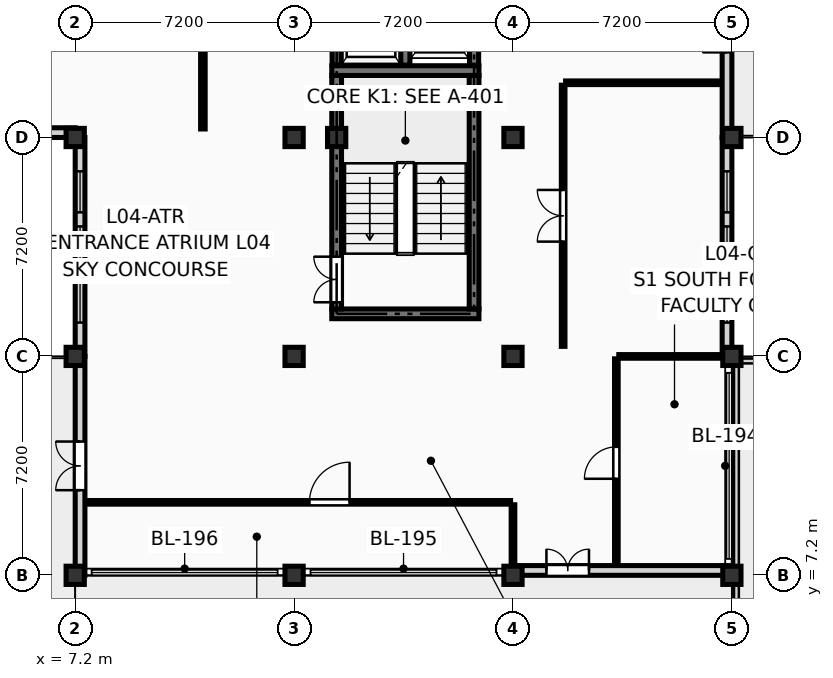
"""IFC4 building model, lengths in metres.
Left out: names, types, materials, properties, quantities, classifications, styles, units other than length and angle.
Written with IfcOpenShell. Run it as: python <this file> out.ifc"""

import sys

from ifc_helpers import new_model, si_unit, direction, frame, frame_2d, origin, origin_2d, place, context, subcontext, project, spatial, rectangle, extrude, element, fill, save


model = new_model("IFC4")
c1 = context("Model", 3, precision=1e-05, world=origin(), true_north=direction((0.0, 1.0)))
c2 = subcontext(c1, "Body", "Model", "MODEL_VIEW")
j1 = project(units=[si_unit("LENGTHUNIT", "METRE"), si_unit("PLANEANGLEUNIT", "RADIAN")], contexts=[c1])
p1 = place(None, origin())
s1 = spatial("IfcSite", under=j1, at=p1, CompositionType="ELEMENT")
p2 = place(p1, origin())
s2 = spatial("IfcBuilding", under=s1, at=p2, CompositionType="ELEMENT")
p3 = place(p2, frame((0.0, 0.0, 15.75)))
s3 = spatial("IfcBuildingStorey", under=s2, at=p3, CompositionType="ELEMENT", Elevation=15.75)
for number, where, z_axis, x_axis in (
    (1, (7.2, 7.2, 0.0), (0.0, 0.0, 1.0), (1.0, 0.0, 0.0)),
    (2, (7.2, 14.4, 0.0), (0.0, 0.0, 1.0), (1.0, 0.0, 0.0)),
    (3, (7.2, 21.6, 0.0), (0.0, 0.0, 1.0), (1.0, 0.0, 0.0)),
    (4, (14.4, 7.2, 0.0), (0.0, 0.0, 1.0), (1.0, 0.0, 0.0)),
    (5, (14.4, 14.4, 0.0), (0.0, 0.0, 1.0), (1.0, 0.0, 0.0)),
    (6, (14.4, 21.6, 0.0), (0.0, 0.0, 1.0), (1.0, 0.0, 0.0)),
    (7, (15.8, 21.6, 0.0), (0.0, 0.0, 1.0), (1.0, 0.0, 0.0)),
    (8, (21.6, 7.2, 0.0), (0.0, 0.0, 1.0), (1.0, 0.0, 0.0)),
    (9, (21.6, 14.4, 0.0), (0.0, 0.0, 1.0), (1.0, 0.0, 0.0)),
    (10, (21.6, 21.6, 0.0), (0.0, 0.0, 1.0), (1.0, 0.0, 0.0)),
    (11, (28.8, 7.2, 0.0), (0.0, 0.0, 1.0), (1.0, 0.0, 0.0)),
    (12, (28.8, 14.4, 0.0), (0.0, 0.0, 1.0), (1.0, 0.0, 0.0)),
    (13, (28.8, 21.6, 0.0), (0.0, 0.0, 1.0), (1.0, 0.0, 0.0)),
):
    element("IfcColumn", number, at=place(p3, frame(where, z_axis=z_axis, x_axis=x_axis)), inside=s3, PredefinedType="COLUMN", context=c2, shape_type="SweptSolid", body=[
        extrude(rectangle(XDim=0.6, YDim=0.6, at=origin_2d()), origin(), (0.0, 0.0, 1.0), 3.6),
    ])
p4 = place(p3, frame((7.36, 7.2, 0.0), z_axis=(0.0, 0.0, 1.0), x_axis=(0.0, 1.0, 0.0)))
e14 = element("IfcWall", 14, at=p4, inside=s3, PredefinedType="SOLIDWALL", context=c2, shape_type="SweptSolid", body=[
    extrude(rectangle(XDim=7.2, YDim=0.32, at=frame_2d((3.6, 0.0))), origin(), (0.0, 0.0, 1.0), 2.84),
])
p5 = place(p4, frame((2.8, 0.0, 0.0)))
e15 = element("IfcOpeningElement", 15, at=p5, cuts=e14, PredefinedType="OPENING", context=c2, shape_type="SweptSolid", body=[
    extrude(rectangle(XDim=1.6, YDim=2.25, at=frame_2d((0.8, 1.125))), frame((0.0, 0.172, 0.0), z_axis=(0.0, -1.0, 0.0), x_axis=(1.0, 0.0, 0.0)), (0.0, 0.0, 1.0), 0.344),
])
p6 = place(p3, frame((7.36, 14.4, 0.0), z_axis=(0.0, 0.0, 1.0), x_axis=(0.0, 1.0, 0.0)))
e16 = element("IfcWall", 16, at=p6, inside=s3, PredefinedType="SOLIDWALL", context=c2, shape_type="SweptSolid", body=[
    extrude(rectangle(XDim=7.2, YDim=0.32, at=frame_2d((3.6, 0.0))), origin(), (0.0, 0.0, 1.0), 2.84),
])
p7 = place(p6, frame((1.113, 0.0, 0.18)))
e17 = element("IfcOpeningElement", 17, at=p7, cuts=e16, PredefinedType="OPENING", context=c2, shape_type="SweptSolid", body=[
    extrude(rectangle(XDim=1.35, YDim=2.45, at=frame_2d((0.675, 1.225))), frame((0.0, 0.172, 0.0), z_axis=(0.0, -1.0, 0.0), x_axis=(1.0, 0.0, 0.0)), (0.0, 0.0, 1.0), 0.344),
])
p8 = place(p6, frame((2.925, 0.0, 0.18)))
e18 = element("IfcOpeningElement", 18, at=p8, cuts=e16, PredefinedType="OPENING", context=c2, shape_type="SweptSolid", body=[
    extrude(rectangle(XDim=1.35, YDim=2.45, at=frame_2d((0.675, 1.225))), frame((0.0, 0.172, 0.0), z_axis=(0.0, -1.0, 0.0), x_axis=(1.0, 0.0, 0.0)), (0.0, 0.0, 1.0), 0.344),
])
p9 = place(p6, frame((4.738, 0.0, 0.18)))
e19 = element("IfcOpeningElement", 19, at=p9, cuts=e16, PredefinedType="OPENING", context=c2, shape_type="SweptSolid", body=[
    extrude(rectangle(XDim=1.35, YDim=2.45, at=frame_2d((0.675, 1.225))), frame((0.0, 0.172, 0.0), z_axis=(0.0, -1.0, 0.0), x_axis=(1.0, 0.0, 0.0)), (0.0, 0.0, 1.0), 0.344),
])
p10 = place(p3, frame((1.8, 21.76, 0.0), z_axis=(0.0, 0.0, 1.0), x_axis=(1.0, 0.0, 0.0)))
e20 = element("IfcWall", 20, at=p10, inside=s3, PredefinedType="SOLIDWALL", context=c2, shape_type="SweptSolid", body=[
    extrude(rectangle(XDim=5.4, YDim=0.32, at=frame_2d((2.7, 0.0))), origin(), (0.0, 0.0, 1.0), 2.696),
])
p11 = place(p10, frame((1.15, 0.0, 0.18)))
e21 = element("IfcOpeningElement", 21, at=p11, cuts=e20, PredefinedType="OPENING", context=c2, shape_type="SweptSolid", body=[
    extrude(rectangle(XDim=1.3, YDim=2.35, at=frame_2d((0.65, 1.175))), frame((0.0, 0.172, 0.0), z_axis=(0.0, -1.0, 0.0), x_axis=(1.0, 0.0, 0.0)), (0.0, 0.0, 1.0), 0.344),
])
p12 = place(p10, frame((2.95, 0.0, 0.18)))
e22 = element("IfcOpeningElement", 22, at=p12, cuts=e20, PredefinedType="OPENING", context=c2, shape_type="SweptSolid", body=[
    extrude(rectangle(XDim=1.3, YDim=2.35, at=frame_2d((0.65, 1.175))), frame((0.0, 0.172, 0.0), z_axis=(0.0, -1.0, 0.0), x_axis=(1.0, 0.0, 0.0)), (0.0, 0.0, 1.0), 0.344),
])
p13 = place(p3, frame((28.64, 21.6, 0.0), z_axis=(0.0, 0.0, 1.0), x_axis=(0.0, 1.0, 0.0)))
e23 = element("IfcWall", 23, at=p13, inside=s3, PredefinedType="SOLIDWALL", context=c2, shape_type="SweptSolid", body=[
    extrude(rectangle(XDim=7.2, YDim=0.32, at=frame_2d((3.6, 0.0))), origin(), (0.0, 0.0, 1.0), 2.84),
])
p14 = place(p13, frame((2.8, 0.0, 0.0)))
e24 = element("IfcOpeningElement", 24, at=p14, cuts=e23, PredefinedType="OPENING", context=c2, shape_type="SweptSolid", body=[
    extrude(rectangle(XDim=1.6, YDim=2.25, at=frame_2d((0.8, 1.125))), frame((0.0, 0.172, 0.0), z_axis=(0.0, -1.0, 0.0), x_axis=(1.0, 0.0, 0.0)), (0.0, 0.0, 1.0), 0.344),
])
p15 = place(p3, frame((28.64, 14.4, 0.0), z_axis=(0.0, 0.0, 1.0), x_axis=(0.0, 1.0, 0.0)))
e25 = element("IfcWall", 25, at=p15, inside=s3, PredefinedType="SOLIDWALL", context=c2, shape_type="SweptSolid", body=[
    extrude(rectangle(XDim=7.2, YDim=0.32, at=frame_2d((3.6, 0.0))), origin(), (0.0, 0.0, 1.0), 2.84),
])
p16 = place(p15, frame((1.113, 0.0, 0.18)))
e26 = element("IfcOpeningElement", 26, at=p16, cuts=e25, PredefinedType="OPENING", context=c2, shape_type="SweptSolid", body=[
    extrude(rectangle(XDim=1.35, YDim=2.45, at=frame_2d((0.675, 1.225))), frame((0.0, 0.172, 0.0), z_axis=(0.0, -1.0, 0.0), x_axis=(1.0, 0.0, 0.0)), (0.0, 0.0, 1.0), 0.344),
])
p17 = place(p15, frame((2.925, 0.0, 0.18)))
e27 = element("IfcOpeningElement", 27, at=p17, cuts=e25, PredefinedType="OPENING", context=c2, shape_type="SweptSolid", body=[
    extrude(rectangle(XDim=1.35, YDim=2.45, at=frame_2d((0.675, 1.225))), frame((0.0, 0.172, 0.0), z_axis=(0.0, -1.0, 0.0), x_axis=(1.0, 0.0, 0.0)), (0.0, 0.0, 1.0), 0.344),
])
p18 = place(p15, frame((4.738, 0.0, 0.18)))
e28 = element("IfcOpeningElement", 28, at=p18, cuts=e25, PredefinedType="OPENING", context=c2, shape_type="SweptSolid", body=[
    extrude(rectangle(XDim=1.35, YDim=2.45, at=frame_2d((0.675, 1.225))), frame((0.0, 0.172, 0.0), z_axis=(0.0, -1.0, 0.0), x_axis=(1.0, 0.0, 0.0)), (0.0, 0.0, 1.0), 0.344),
])
p19 = place(p3, frame((21.6, 7.36, 0.0), z_axis=(0.0, 0.0, 1.0), x_axis=(1.0, 0.0, 0.0)))
e29 = element("IfcWall", 29, at=p19, inside=s3, PredefinedType="SOLIDWALL", context=c2, shape_type="SweptSolid", body=[
    extrude(rectangle(XDim=7.2, YDim=0.32, at=frame_2d((3.6, 0.0))), origin(), (0.0, 0.0, 1.0), 2.84),
])
p20 = place(p19, frame((1.1, 0.0, 0.0)))
e30 = element("IfcOpeningElement", 30, at=p20, cuts=e29, PredefinedType="OPENING", context=c2, shape_type="SweptSolid", body=[
    extrude(rectangle(XDim=1.4, YDim=2.2, at=frame_2d((0.7, 1.1))), frame((0.0, 0.172, 0.0), z_axis=(0.0, -1.0, 0.0), x_axis=(1.0, 0.0, 0.0)), (0.0, 0.0, 1.0), 0.344),
])
for number, where, z_axis, x_axis in (
    (31, (43.05, 14.25, 0.1), (0.0, 0.0, 1.0), (-1.0, 0.0, 0.0)),
    (32, (28.95, 14.25, 0.1), (0.0, 0.0, 1.0), (0.0, -1.0, 0.0)),
):
    element("IfcWall", number, at=place(p3, frame(where, z_axis=z_axis, x_axis=x_axis)), inside=s3, PredefinedType="PARAPET", context=c2, shape_type="SweptSolid", body=[
        extrude(rectangle(XDim=14.1, YDim=0.16, at=frame_2d((7.05, 0.0))), origin(), (0.0, 0.0, 1.0), 1.0),
    ])
for number, where, z_axis, x_axis in (
    (33, (15.64, 15.8, 0.0), (0.0, 0.0, 1.0), (1.0, 0.0, 0.0)),
    (34, (15.64, 23.8, 0.0), (0.0, 0.0, 1.0), (1.0, 0.0, 0.0)),
):
    element("IfcWall", number, at=place(p3, frame(where, z_axis=z_axis, x_axis=x_axis)), inside=s3, PredefinedType="SHEAR", context=c2, shape_type="SweptSolid", body=[
        extrude(rectangle(XDim=4.84, YDim=0.32, at=frame_2d((2.42, 0.0))), origin(), (0.0, 0.0, 1.0), 3.39),
    ])
p21 = place(p3, frame((15.8, 15.96, 0.0), z_axis=(0.0, 0.0, 1.0), x_axis=(0.0, 1.0, 0.0)))
e35 = element("IfcWall", 35, at=p21, inside=s3, PredefinedType="SHEAR", context=c2, shape_type="SweptSolid", body=[
    extrude(rectangle(XDim=7.68, YDim=0.32, at=frame_2d((3.84, 0.0))), origin(), (0.0, 0.0, 1.0), 3.39),
])
p22 = place(p21, frame((0.22, 0.0, 0.0)))
e36 = element("IfcOpeningElement", 36, at=p22, cuts=e35, PredefinedType="OPENING", context=c2, shape_type="SweptSolid", body=[
    extrude(rectangle(XDim=1.5, YDim=2.2, at=frame_2d((0.75, 1.1))), frame((0.0, 0.172, 0.0), z_axis=(0.0, -1.0, 0.0), x_axis=(1.0, 0.0, 0.0)), (0.0, 0.0, 1.0), 0.344),
])
p23 = place(p3, frame((20.32, 15.96, 0.0), z_axis=(0.0, 0.0, 1.0), x_axis=(0.0, 1.0, 0.0)))
e37 = element("IfcWall", 37, at=p23, inside=s3, PredefinedType="SHEAR", context=c2, shape_type="SweptSolid", body=[
    extrude(rectangle(XDim=7.68, YDim=0.32, at=frame_2d((3.84, 0.0))), origin(), (0.0, 0.0, 1.0), 3.39),
])
p24 = place(p3, frame((15.8, 23.98, 0.0), z_axis=(0.0, 0.0, 1.0), x_axis=(0.0, 1.0, 0.0)))
e38 = element("IfcWall", 38, at=p24, inside=s3, PredefinedType="SHEAR", context=c2, shape_type="SweptSolid", body=[
    extrude(rectangle(XDim=2.97, YDim=0.3, at=frame_2d((1.485, 0.0))), origin(), (0.0, 0.0, 1.0), 3.39),
])
p25 = place(p24, frame((0.835, 0.0, 0.0)))
e39 = element("IfcOpeningElement", 39, at=p25, cuts=e38, PredefinedType="OPENING", context=c2, shape_type="SweptSolid", body=[
    extrude(rectangle(XDim=1.3, YDim=2.25, at=frame_2d((0.65, 1.125))), frame((0.0, 0.162, 0.0), z_axis=(0.0, -1.0, 0.0), x_axis=(1.0, 0.0, 0.0)), (0.0, 0.0, 1.0), 0.324),
])
for number, where, z_axis, x_axis in (
    (40, (18.06, 23.98, 0.0), (0.0, 0.0, 1.0), (0.0, 1.0, 0.0)),
    (41, (20.32, 23.98, 0.0), (0.0, 0.0, 1.0), (0.0, 1.0, 0.0)),
):
    element("IfcWall", number, at=place(p3, frame(where, z_axis=z_axis, x_axis=x_axis)), inside=s3, PredefinedType="SHEAR", context=c2, shape_type="SweptSolid", body=[
        extrude(rectangle(XDim=2.97, YDim=0.3, at=frame_2d((1.485, 0.0))), origin(), (0.0, 0.0, 1.0), 3.39),
    ])
p26 = place(p3, frame((21.6, 7.56, 0.0), z_axis=(0.0, 0.0, 1.0), x_axis=(0.0, 1.0, 0.0)))
e42 = element("IfcWall", 42, at=p26, inside=s3, PredefinedType="PARTITIONING", context=c2, shape_type="SweptSolid", body=[
    extrude(rectangle(XDim=1.96, YDim=0.12, at=frame_2d((0.98, 0.0))), origin(), (0.0, 0.0, 1.0), 2.655),
])
p27 = place(p3, frame((7.58, 9.6, 0.0), z_axis=(0.0, 0.0, 1.0), x_axis=(1.0, 0.0, 0.0)))
e43 = element("IfcWall", 43, at=p27, inside=s3, PredefinedType="PARTITIONING", context=c2, shape_type="SweptSolid", body=[
    extrude(rectangle(XDim=13.94, YDim=0.12, at=frame_2d((6.97, 0.0))), origin(), (0.0, 0.0, 1.0), 3.375),
])
p28 = place(p27, frame((7.325, 0.0, 0.0)))
e44 = element("IfcOpeningElement", 44, at=p28, cuts=e43, PredefinedType="OPENING", context=c2, shape_type="SweptSolid", body=[
    extrude(rectangle(XDim=1.32, YDim=2.2, at=frame_2d((0.66, 1.1))), frame((0.0, 0.072, 0.0), z_axis=(0.0, -1.0, 0.0), x_axis=(1.0, 0.0, 0.0)), (0.0, 0.0, 1.0), 0.144),
])
p29 = place(p3, frame((25.0, 7.56, 0.0), z_axis=(0.0, 0.0, 1.0), x_axis=(0.0, 1.0, 0.0)))
e45 = element("IfcWall", 45, at=p29, inside=s3, PredefinedType="PARTITIONING", context=c2, shape_type="SweptSolid", body=[
    extrude(rectangle(XDim=6.76, YDim=0.12, at=frame_2d((3.38, 0.0))), origin(), (0.0, 0.0, 1.0), 3.375),
])
p30 = place(p29, frame((2.815, 0.0, 0.0)))
e46 = element("IfcOpeningElement", 46, at=p30, cuts=e45, PredefinedType="OPENING", context=c2, shape_type="SweptSolid", body=[
    extrude(rectangle(XDim=1.05, YDim=2.18, at=frame_2d((0.525, 1.09))), frame((0.0, 0.072, 0.0), z_axis=(0.0, -1.0, 0.0), x_axis=(1.0, 0.0, 0.0)), (0.0, 0.0, 1.0), 0.144),
])
p31 = place(p3, frame((25.08, 14.4, 0.0), z_axis=(0.0, 0.0, 1.0), x_axis=(1.0, 0.0, 0.0)))
e47 = element("IfcWall", 47, at=p31, inside=s3, PredefinedType="PARTITIONING", context=c2, shape_type="SweptSolid", body=[
    extrude(rectangle(XDim=3.34, YDim=0.12, at=frame_2d((1.67, 0.0))), origin(), (0.0, 0.0, 1.0), 2.655),
])
p32 = place(p3, frame((11.4, 21.88, 0.0), z_axis=(0.0, 0.0, 1.0), x_axis=(0.0, 1.0, 0.0)))
e48 = element("IfcWall", 48, at=p32, inside=s3, PredefinedType="PARTITIONING", context=c2, shape_type="SweptSolid", body=[
    extrude(rectangle(XDim=11.44, YDim=0.15, at=frame_2d((5.72, 0.0))), origin(), (0.0, 0.0, 1.0), 3.375),
])
p33 = place(p32, frame((5.045, 0.0, 0.0)))
e49 = element("IfcOpeningElement", 49, at=p33, cuts=e48, PredefinedType="OPENING", context=c2, shape_type="SweptSolid", body=[
    extrude(rectangle(XDim=1.35, YDim=2.2, at=frame_2d((0.675, 1.1))), frame((0.0, 0.087, 0.0), z_axis=(0.0, -1.0, 0.0), x_axis=(1.0, 0.0, 0.0)), (0.0, 0.0, 1.0), 0.174),
])
p34 = place(p3, frame((23.25, 14.73, 0.0), z_axis=(0.0, 0.0, 1.0), x_axis=(0.0, 1.0, 0.0)))
e50 = element("IfcWall", 50, at=p34, inside=s3, PredefinedType="PARTITIONING", context=c2, shape_type="SweptSolid", body=[
    extrude(rectangle(XDim=8.59, YDim=0.12, at=frame_2d((4.295, 0.0))), origin(), (0.0, 0.0, 1.0), 3.375),
])
p35 = place(p34, frame((3.445, 0.0, 0.0)))
e51 = element("IfcOpeningElement", 51, at=p35, cuts=e50, PredefinedType="OPENING", context=c2, shape_type="SweptSolid", body=[
    extrude(rectangle(XDim=1.7, YDim=2.28, at=frame_2d((0.85, 1.14))), frame((0.0, 0.072, 0.0), z_axis=(0.0, -1.0, 0.0), x_axis=(1.0, 0.0, 0.0)), (0.0, 0.0, 1.0), 0.144),
])
p36 = place(p3, frame((23.33, 23.4, 0.0), z_axis=(0.0, 0.0, 1.0), x_axis=(1.0, 0.0, 0.0)))
e52 = element("IfcWall", 52, at=p36, inside=s3, PredefinedType="PARTITIONING", context=c2, shape_type="SweptSolid", body=[
    extrude(rectangle(XDim=5.09, YDim=0.12, at=frame_2d((2.545, 0.0))), origin(), (0.0, 0.0, 1.0), 3.375),
])
p37 = place(p5, origin())
e53 = element("IfcDoor", 53, at=p37, inside=s3, OperationType="DOUBLE_DOOR_SINGLE_SWING", PredefinedType="DOOR", context=c2, shape_type="SweptSolid", body=[
    extrude(rectangle(XDim=1.6, YDim=2.25, at=frame_2d((0.8, 1.125))), frame((0.0, 0.025, 0.0), z_axis=(0.0, -1.0, 0.0), x_axis=(1.0, 0.0, 0.0)), (0.0, 0.0, 1.0), 0.05),
])
fill(e15, e53)
p38 = place(p7, origin())
e54 = element("IfcWindow", 54, at=p38, inside=s3, PartitioningType="SINGLE_PANEL", PredefinedType="WINDOW", context=c2, shape_type="SweptSolid", body=[
    extrude(rectangle(XDim=1.35, YDim=2.45, at=frame_2d((0.675, 1.225))), frame((0.0, 0.03, 0.0), z_axis=(0.0, -1.0, 0.0), x_axis=(1.0, 0.0, 0.0)), (0.0, 0.0, 1.0), 0.06),
])
fill(e17, e54)
p39 = place(p8, origin())
e55 = element("IfcWindow", 55, at=p39, inside=s3, PartitioningType="SINGLE_PANEL", PredefinedType="WINDOW", context=c2, shape_type="SweptSolid", body=[
    extrude(rectangle(XDim=1.35, YDim=2.45, at=frame_2d((0.675, 1.225))), frame((0.0, 0.03, 0.0), z_axis=(0.0, -1.0, 0.0), x_axis=(1.0, 0.0, 0.0)), (0.0, 0.0, 1.0), 0.06),
])
fill(e18, e55)
p40 = place(p9, origin())
e56 = element("IfcWindow", 56, at=p40, inside=s3, PartitioningType="SINGLE_PANEL", PredefinedType="WINDOW", context=c2, shape_type="SweptSolid", body=[
    extrude(rectangle(XDim=1.35, YDim=2.45, at=frame_2d((0.675, 1.225))), frame((0.0, 0.03, 0.0), z_axis=(0.0, -1.0, 0.0), x_axis=(1.0, 0.0, 0.0)), (0.0, 0.0, 1.0), 0.06),
])
fill(e19, e56)
p41 = place(p16, origin())
e57 = element("IfcWindow", 57, at=p41, inside=s3, PartitioningType="SINGLE_PANEL", PredefinedType="WINDOW", context=c2, shape_type="SweptSolid", body=[
    extrude(rectangle(XDim=1.35, YDim=2.45, at=frame_2d((0.675, 1.225))), frame((0.0, 0.03, 0.0), z_axis=(0.0, -1.0, 0.0), x_axis=(1.0, 0.0, 0.0)), (0.0, 0.0, 1.0), 0.06),
])
fill(e26, e57)
p42 = place(p17, origin())
e58 = element("IfcWindow", 58, at=p42, inside=s3, PartitioningType="SINGLE_PANEL", PredefinedType="WINDOW", context=c2, shape_type="SweptSolid", body=[
    extrude(rectangle(XDim=1.35, YDim=2.45, at=frame_2d((0.675, 1.225))), frame((0.0, 0.03, 0.0), z_axis=(0.0, -1.0, 0.0), x_axis=(1.0, 0.0, 0.0)), (0.0, 0.0, 1.0), 0.06),
])
fill(e27, e58)
p43 = place(p18, origin())
e59 = element("IfcWindow", 59, at=p43, inside=s3, PartitioningType="SINGLE_PANEL", PredefinedType="WINDOW", context=c2, shape_type="SweptSolid", body=[
    extrude(rectangle(XDim=1.35, YDim=2.45, at=frame_2d((0.675, 1.225))), frame((0.0, 0.03, 0.0), z_axis=(0.0, -1.0, 0.0), x_axis=(1.0, 0.0, 0.0)), (0.0, 0.0, 1.0), 0.06),
])
fill(e28, e59)
p44 = place(p20, origin())
e60 = element("IfcDoor", 60, at=p44, inside=s3, OperationType="DOUBLE_DOOR_SINGLE_SWING", PredefinedType="DOOR", context=c2, shape_type="SweptSolid", body=[
    extrude(rectangle(XDim=1.4, YDim=2.2, at=frame_2d((0.7, 1.1))), frame((0.0, 0.025, 0.0), z_axis=(0.0, -1.0, 0.0), x_axis=(1.0, 0.0, 0.0)), (0.0, 0.0, 1.0), 0.05),
])
fill(e30, e60)
p45 = place(p22, origin())
e61 = element("IfcDoor", 61, at=p45, inside=s3, OperationType="DOUBLE_DOOR_SINGLE_SWING", PredefinedType="DOOR", context=c2, shape_type="SweptSolid", body=[
    extrude(rectangle(XDim=1.5, YDim=2.2, at=frame_2d((0.75, 1.1))), frame((0.0, 0.025, 0.0), z_axis=(0.0, -1.0, 0.0), x_axis=(1.0, 0.0, 0.0)), (0.0, 0.0, 1.0), 0.05),
])
fill(e36, e61)
p46 = place(p28, origin())
e62 = element("IfcDoor", 62, at=p46, inside=s3, OperationType="SINGLE_SWING_RIGHT", PredefinedType="DOOR", context=c2, shape_type="SweptSolid", body=[
    extrude(rectangle(XDim=1.32, YDim=2.2, at=frame_2d((0.66, 1.1))), frame((0.0, 0.025, 0.0), z_axis=(0.0, -1.0, 0.0), x_axis=(1.0, 0.0, 0.0)), (0.0, 0.0, 1.0), 0.05),
])
fill(e44, e62)
p47 = place(p30, origin())
e63 = element("IfcDoor", 63, at=p47, inside=s3, OperationType="SINGLE_SWING_LEFT", PredefinedType="DOOR", context=c2, shape_type="SweptSolid", body=[
    extrude(rectangle(XDim=1.05, YDim=2.18, at=frame_2d((0.525, 1.09))), frame((0.0, 0.025, 0.0), z_axis=(0.0, -1.0, 0.0), x_axis=(1.0, 0.0, 0.0)), (0.0, 0.0, 1.0), 0.05),
])
fill(e46, e63)
p48 = place(p35, origin())
e64 = element("IfcDoor", 64, at=p48, inside=s3, OperationType="DOUBLE_DOOR_SINGLE_SWING", PredefinedType="DOOR", context=c2, shape_type="SweptSolid", body=[
    extrude(rectangle(XDim=1.7, YDim=2.28, at=frame_2d((0.85, 1.14))), frame((0.0, 0.025, 0.0), z_axis=(0.0, -1.0, 0.0), x_axis=(1.0, 0.0, 0.0)), (0.0, 0.0, 1.0), 0.05),
])
fill(e51, e64)
save(model, sys.argv[1])
